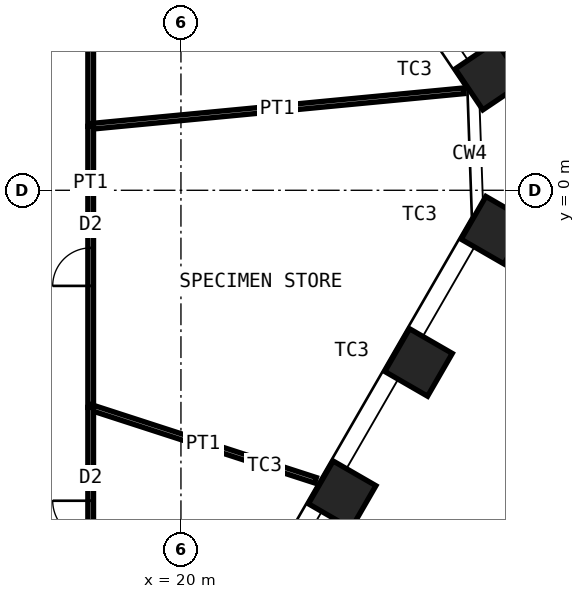
"""IFC4 building model, lengths in metres.
Left out: names, types, materials, properties, quantities, classifications, styles, units other than length and angle.
Written with IfcOpenShell. Run it as: python <this file> out.ifc"""

import sys

from ifc_helpers import new_model, si_unit, direction, frame, frame_2d, origin, origin_2d, place, context, subcontext, project, spatial, rectangle, hollow_rectangle, extrude, element, fill, save


model = new_model("IFC4")
c1 = context("Model", 3, precision=1e-05, world=origin(), true_north=direction((0.0, 1.0)))
c2 = subcontext(c1, "Body", "Model", "MODEL_VIEW")
j1 = project(units=[si_unit("LENGTHUNIT", "METRE"), si_unit("PLANEANGLEUNIT", "RADIAN")], contexts=[c1])
p1 = place(None, origin())
s1 = spatial("IfcSite", under=j1, at=p1, CompositionType="ELEMENT")
p2 = place(p1, origin())
s2 = spatial("IfcBuilding", under=s1, at=p2, CompositionType="ELEMENT")
p3 = place(p2, frame((0.0, 0.0, 128.2)))
s3 = spatial("IfcBuildingStorey", under=s2, at=p3, CompositionType="ELEMENT", Elevation=128.2)
for number, where, z_axis, x_axis in (
    (1, (28.119, 3.019, 0.0), (0.0, 0.0, 1.0), (-0.559, 0.829, 0.0)),
    (2, (28.261, -1.05, 0.0), (0.0, 0.0, 1.0), (0.5, 0.866, 0.0)),
    (3, (26.252, -4.53, 0.0), (0.0, 0.0, 1.0), (0.5, 0.866, 0.0)),
    (4, (24.242, -8.011, 0.0), (0.0, 0.0, 1.0), (0.5, 0.866, 0.0)),
):
    element("IfcColumn", number, at=place(p3, frame(where, z_axis=z_axis, x_axis=x_axis)), inside=s3, PredefinedType="COLUMN", context=c2, shape_type="SweptSolid", body=[
        extrude(hollow_rectangle(XDim=1.3, YDim=1.3, WallThickness=0.1, at=origin_2d()), origin(), (0.0, 0.0, 1.0), 4.2),
    ])
p4 = place(p3, frame((17.625, 7.106, 0.0), z_axis=(0.0, 0.0, 1.0), x_axis=(0.0, -1.0, 0.0)))
e5 = element("IfcWall", 5, at=p4, inside=s3, PredefinedType="PARTITIONING", context=c2, shape_type="SweptSolid", body=[
    extrude(rectangle(XDim=5.425, YDim=0.15, at=frame_2d((2.712, 0.0))), origin(), (0.0, 0.0, 1.0), 4.03),
])
p5 = place(p4, frame((2.212, 0.0, 0.0)))
e6 = element("IfcOpeningElement", 6, at=p5, cuts=e5, PredefinedType="OPENING", context=c2, shape_type="SweptSolid", body=[
    extrude(rectangle(XDim=1.0, YDim=2.4, at=frame_2d((0.5, 1.2))), frame((0.0, 0.085, 0.0), z_axis=(0.0, -1.0, 0.0), x_axis=(1.0, 0.0, 0.0)), (0.0, 0.0, 1.0), 0.17),
])
p6 = place(p3, frame((27.439, 2.618, 0.0), z_axis=(0.0, 0.0, 1.0), x_axis=(-0.995480435234, -0.094966852466, 0.0)))
e7 = element("IfcWall", 7, at=p6, inside=s3, PredefinedType="PARTITIONING", context=c2, shape_type="SweptSolid", body=[
    extrude(rectangle(XDim=9.859, YDim=0.15, at=frame_2d((4.93, 0.0))), origin(), (0.0, 0.0, 1.0), 2.93),
])
p7 = place(p3, frame((17.625, 1.681, 0.0), z_axis=(0.0, 0.0, 1.0), x_axis=(0.0, -1.0, 0.0)))
e8 = element("IfcWall", 8, at=p7, inside=s3, PredefinedType="PARTITIONING", context=c2, shape_type="SweptSolid", body=[
    extrude(rectangle(XDim=7.394, YDim=0.15, at=frame_2d((3.697, 0.0))), origin(), (0.0, 0.0, 1.0), 4.03),
])
p8 = place(p7, frame((3.197, 0.0, 0.0)))
e9 = element("IfcOpeningElement", 9, at=p8, cuts=e8, PredefinedType="OPENING", context=c2, shape_type="SweptSolid", body=[
    extrude(rectangle(XDim=1.0, YDim=2.4, at=frame_2d((0.5, 1.2))), frame((0.0, 0.085, 0.0), z_axis=(0.0, -1.0, 0.0), x_axis=(1.0, 0.0, 0.0)), (0.0, 0.0, 1.0), 0.17),
])
p9 = place(p3, frame((23.541, -7.63, 0.0), z_axis=(0.0, 0.0, 1.0), x_axis=(-0.951280715006, 0.308326128081, 0.0)))
e10 = element("IfcWall", 10, at=p9, inside=s3, PredefinedType="PARTITIONING", context=c2, shape_type="SweptSolid", body=[
    extrude(rectangle(XDim=6.219, YDim=0.15, at=frame_2d((3.109, 0.0))), origin(), (0.0, 0.0, 1.0), 3.33),
])
p10 = place(p3, frame((17.625, -5.713, 0.0), z_axis=(0.0, 0.0, 1.0), x_axis=(0.0, -1.0, 0.0)))
e11 = element("IfcWall", 11, at=p10, inside=s3, PredefinedType="PARTITIONING", context=c2, shape_type="SweptSolid", body=[
    extrude(rectangle(XDim=5.912, YDim=0.15, at=frame_2d((2.956, 0.0))), origin(), (0.0, 0.0, 1.0), 4.03),
])
p11 = place(p10, frame((2.456, 0.0, 0.0)))
e12 = element("IfcOpeningElement", 12, at=p11, cuts=e11, PredefinedType="OPENING", context=c2, shape_type="SweptSolid", body=[
    extrude(rectangle(XDim=1.0, YDim=2.4, at=frame_2d((0.5, 1.2))), frame((0.0, 0.085, 0.0), z_axis=(0.0, -1.0, 0.0), x_axis=(1.0, 0.0, 0.0)), (0.0, 0.0, 1.0), 0.17),
])
p12 = place(p8, origin())
e13 = element("IfcDoor", 13, at=p12, inside=s3, OperationType="SINGLE_SWING_RIGHT", PredefinedType="DOOR", context=c2, shape_type="SweptSolid", body=[
    extrude(rectangle(XDim=1.0, YDim=2.4, at=frame_2d((0.5, 1.2))), frame((0.0, 0.025, 0.0), z_axis=(0.0, -1.0, 0.0), x_axis=(1.0, 0.0, 0.0)), (0.0, 0.0, 1.0), 0.05),
])
fill(e9, e13)
p13 = place(p11, origin())
e14 = element("IfcDoor", 14, at=p13, inside=s3, OperationType="SINGLE_SWING_LEFT", PredefinedType="DOOR", context=c2, shape_type="SweptSolid", body=[
    extrude(rectangle(XDim=1.0, YDim=2.4, at=frame_2d((0.5, 1.2))), frame((0.0, 0.025, 0.0), z_axis=(0.0, -1.0, 0.0), x_axis=(1.0, 0.0, 0.0)), (0.0, 0.0, 1.0), 0.05),
])
fill(e12, e14)
save(model, sys.argv[1])
